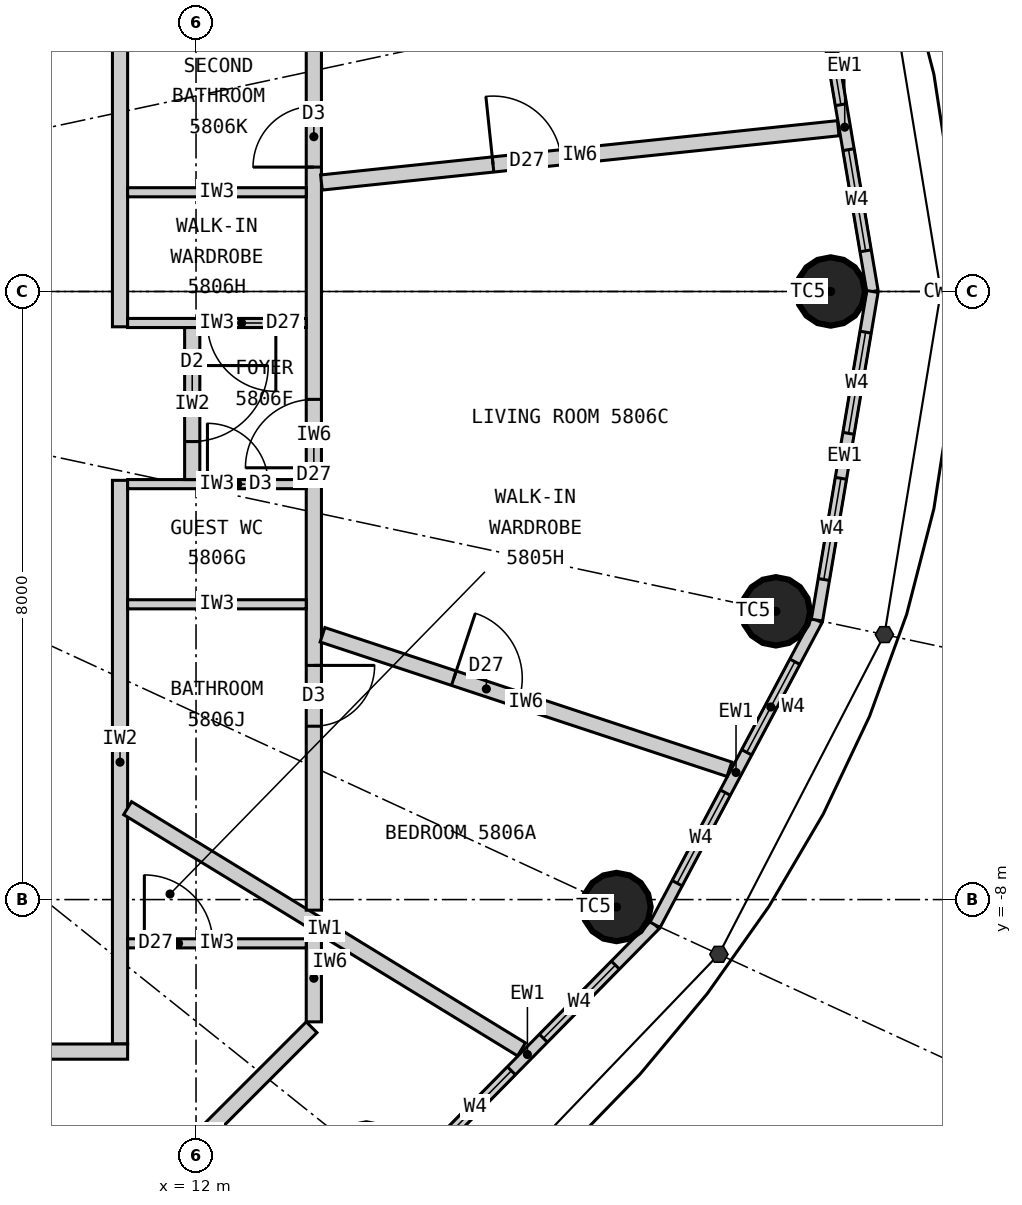
"""IFC4 building model, lengths in metres.
Left out: names, types, materials, properties, quantities, classifications, styles, units other than length and angle.
Written with IfcOpenShell. Run it as: python <this file> out.ifc"""

import sys

from ifc_helpers import new_model, si_unit, direction, frame, frame_2d, origin, origin_2d, place, context, subcontext, project, spatial, rectangle, circle, extrude, element, fill, save


model = new_model("IFC4")
c1 = context("Model", 3, precision=1e-05, world=origin(), true_north=direction((0.0, 1.0)))
c2 = subcontext(c1, "Body", "Model", "MODEL_VIEW")
j1 = project(units=[si_unit("LENGTHUNIT", "METRE"), si_unit("PLANEANGLEUNIT", "RADIAN")], contexts=[c1])
p1 = place(None, origin())
s1 = spatial("IfcSite", under=j1, at=p1, CompositionType="ELEMENT")
p2 = place(p1, origin())
s2 = spatial("IfcBuilding", under=s1, at=p2, CompositionType="ELEMENT")
p3 = place(p2, frame((0.0, 0.0, 216.0)))
s3 = spatial("IfcBuildingStorey", under=s2, at=p3, CompositionType="ELEMENT", Elevation=216.0)
for number, where, z_axis, x_axis in (
    (1, (20.35, 0.0, 0.0), (0.0, 0.0, 1.0), (1.0, 0.0, 0.0)),
    (2, (14.241, -11.393, 0.0), (0.0, 0.0, 1.0), (1.0, 0.0, 0.0)),
    (3, (17.532, -8.098, 0.0), (0.0, 0.0, 1.0), (1.0, 0.0, 0.0)),
    (4, (19.629, -4.208, 0.0), (0.0, 0.0, 1.0), (1.0, 0.0, 0.0)),
):
    element("IfcColumn", number, at=place(p3, frame(where, z_axis=z_axis, x_axis=x_axis)), inside=s3, PredefinedType="COLUMN", context=c2, shape_type="SweptSolid", body=[
        extrude(circle(Radius=0.45, at=origin_2d()), origin(), (0.0, 0.0, 1.0), 3.3),
    ])
p4 = place(p3, frame((20.9, 0.0, 0.0), z_axis=(0.0, 0.0, 1.0), x_axis=(-0.166538513568, 0.986034950445, 0.0)))
e5 = element("IfcWall", 5, at=p4, inside=s3, PredefinedType="ELEMENTEDWALL", context=c2, shape_type="SweptSolid", body=[
    extrude(rectangle(XDim=4.385, YDim=0.15, at=frame_2d((2.192, 0.0))), origin(), (0.0, 0.0, 1.0), 3.12),
])
p5 = place(p4, frame((0.542, 0.0, 0.9)))
e6 = element("IfcOpeningElement", 6, at=p5, cuts=e5, PredefinedType="OPENING", context=c2, shape_type="SweptSolid", body=[
    extrude(rectangle(XDim=1.35, YDim=1.9, at=frame_2d((0.675, 0.95))), frame((0.0, 0.085, 0.0), z_axis=(0.0, -1.0, 0.0), x_axis=(1.0, 0.0, 0.0)), (0.0, 0.0, 1.0), 0.17),
])
p6 = place(p4, frame((2.492, 0.0, 0.9)))
e7 = element("IfcOpeningElement", 7, at=p6, cuts=e5, PredefinedType="OPENING", context=c2, shape_type="SweptSolid", body=[
    extrude(rectangle(XDim=1.35, YDim=1.9, at=frame_2d((0.675, 0.95))), frame((0.0, 0.085, 0.0), z_axis=(0.0, -1.0, 0.0), x_axis=(1.0, 0.0, 0.0)), (0.0, 0.0, 1.0), 0.17),
])
p7 = place(p3, frame((14.68, -11.744, 0.0), z_axis=(0.0, 0.0, 1.0), x_axis=(0.701527379618, 0.712642501993, 0.0)))
e8 = element("IfcWall", 8, at=p7, inside=s3, PredefinedType="ELEMENTEDWALL", context=c2, shape_type="SweptSolid", body=[
    extrude(rectangle(XDim=4.788, YDim=0.15, at=frame_2d((2.394, 0.0))), origin(), (0.0, 0.0, 1.0), 3.12),
])
p8 = place(p7, frame((0.744, 0.0, 0.9)))
e9 = element("IfcOpeningElement", 9, at=p8, cuts=e8, PredefinedType="OPENING", context=c2, shape_type="SweptSolid", body=[
    extrude(rectangle(XDim=1.35, YDim=1.9, at=frame_2d((0.675, 0.95))), frame((0.0, 0.085, 0.0), z_axis=(0.0, -1.0, 0.0), x_axis=(1.0, 0.0, 0.0)), (0.0, 0.0, 1.0), 0.17),
])
p9 = place(p7, frame((2.694, 0.0, 0.9)))
e10 = element("IfcOpeningElement", 10, at=p9, cuts=e8, PredefinedType="OPENING", context=c2, shape_type="SweptSolid", body=[
    extrude(rectangle(XDim=1.35, YDim=1.9, at=frame_2d((0.675, 0.95))), frame((0.0, 0.085, 0.0), z_axis=(0.0, -1.0, 0.0), x_axis=(1.0, 0.0, 0.0)), (0.0, 0.0, 1.0), 0.17),
])
p10 = place(p3, frame((18.04, -8.332, 0.0), z_axis=(0.0, 0.0, 1.0), x_axis=(0.469256152955, 0.883062094597, 0.0)))
e11 = element("IfcWall", 11, at=p10, inside=s3, PredefinedType="ELEMENTEDWALL", context=c2, shape_type="SweptSolid", body=[
    extrude(rectangle(XDim=4.539, YDim=0.15, at=frame_2d((2.27, 0.0))), origin(), (0.0, 0.0, 1.0), 3.12),
])
p11 = place(p10, frame((0.62, 0.0, 0.9)))
e12 = element("IfcOpeningElement", 12, at=p11, cuts=e11, PredefinedType="OPENING", context=c2, shape_type="SweptSolid", body=[
    extrude(rectangle(XDim=1.35, YDim=1.9, at=frame_2d((0.675, 0.95))), frame((0.0, 0.085, 0.0), z_axis=(0.0, -1.0, 0.0), x_axis=(1.0, 0.0, 0.0)), (0.0, 0.0, 1.0), 0.17),
])
p12 = place(p10, frame((2.57, 0.0, 0.9)))
e13 = element("IfcOpeningElement", 13, at=p12, cuts=e11, PredefinedType="OPENING", context=c2, shape_type="SweptSolid", body=[
    extrude(rectangle(XDim=1.35, YDim=1.9, at=frame_2d((0.675, 0.95))), frame((0.0, 0.085, 0.0), z_axis=(0.0, -1.0, 0.0), x_axis=(1.0, 0.0, 0.0)), (0.0, 0.0, 1.0), 0.17),
])
p13 = place(p3, frame((20.17, -4.323, 0.0), z_axis=(0.0, 0.0, 1.0), x_axis=(0.166538513568, 0.986034950445, 0.0)))
e14 = element("IfcWall", 14, at=p13, inside=s3, PredefinedType="ELEMENTEDWALL", context=c2, shape_type="SweptSolid", body=[
    extrude(rectangle(XDim=4.385, YDim=0.15, at=frame_2d((2.192, 0.0))), origin(), (0.0, 0.0, 1.0), 3.12),
])
p14 = place(p13, frame((0.542, 0.0, 0.9)))
e15 = element("IfcOpeningElement", 15, at=p14, cuts=e14, PredefinedType="OPENING", context=c2, shape_type="SweptSolid", body=[
    extrude(rectangle(XDim=1.35, YDim=1.9, at=frame_2d((0.675, 0.95))), frame((0.0, 0.085, 0.0), z_axis=(0.0, -1.0, 0.0), x_axis=(1.0, 0.0, 0.0)), (0.0, 0.0, 1.0), 0.17),
])
p15 = place(p13, frame((2.492, 0.0, 0.9)))
e16 = element("IfcOpeningElement", 16, at=p15, cuts=e14, PredefinedType="OPENING", context=c2, shape_type="SweptSolid", body=[
    extrude(rectangle(XDim=1.35, YDim=1.9, at=frame_2d((0.675, 0.95))), frame((0.0, 0.085, 0.0), z_axis=(0.0, -1.0, 0.0), x_axis=(1.0, 0.0, 0.0)), (0.0, 0.0, 1.0), 0.17),
])
p16 = place(p3, frame((11.0, -9.9, 0.0), z_axis=(0.0, 0.0, 1.0), x_axis=(0.0, 1.0, 0.0)))
e17 = element("IfcWall", 17, at=p16, inside=s3, PredefinedType="PARTITIONING", context=c2, shape_type="SweptSolid", body=[
    extrude(rectangle(XDim=7.416, YDim=0.2, at=frame_2d((3.708, 0.0))), origin(), (0.0, 0.0, 1.0), 3.12),
])
p17 = place(p3, frame((11.0, -0.464, 0.0), z_axis=(0.0, 0.0, 1.0), x_axis=(0.0, 1.0, 0.0)))
e18 = element("IfcWall", 18, at=p17, inside=s3, PredefinedType="PARTITIONING", context=c2, shape_type="SweptSolid", body=[
    extrude(rectangle(XDim=10.364, YDim=0.2, at=frame_2d((5.182, 0.0))), origin(), (0.0, 0.0, 1.0), 3.12),
])
p18 = place(p3, frame((11.1, -10.0, 0.0), z_axis=(0.0, 0.0, 1.0), x_axis=(-1.0, 0.0, 0.0)))
e19 = element("IfcWall", 19, at=p18, inside=s3, PredefinedType="PARTITIONING", context=c2, shape_type="SweptSolid", body=[
    extrude(rectangle(XDim=22.2, YDim=0.2, at=frame_2d((11.1, 0.0))), origin(), (0.0, 0.0, 1.0), 3.12),
])
p19 = place(p18, frame((18.864, 0.0, 0.0)))
e20 = element("IfcOpeningElement", 20, at=p19, cuts=e19, PredefinedType="OPENING", context=c2, shape_type="SweptSolid", body=[
    extrude(rectangle(XDim=1.0, YDim=2.2, at=frame_2d((0.5, 1.1))), frame((0.0, 0.11, 0.0), z_axis=(0.0, -1.0, 0.0), x_axis=(1.0, 0.0, 0.0)), (0.0, 0.0, 1.0), 0.22),
])
p20 = place(p18, frame((2.309, 0.0, 0.0)))
e21 = element("IfcOpeningElement", 21, at=p20, cuts=e19, PredefinedType="OPENING", context=c2, shape_type="SweptSolid", body=[
    extrude(rectangle(XDim=1.0, YDim=2.2, at=frame_2d((0.5, 1.1))), frame((0.0, 0.11, 0.0), z_axis=(0.0, -1.0, 0.0), x_axis=(1.0, 0.0, 0.0)), (0.0, 0.0, 1.0), 0.22),
])
p21 = place(p3, frame((11.1, -6.797, 0.0), z_axis=(0.0, 0.0, 1.0), x_axis=(0.852799818179, -0.522237943963, 0.0)))
e22 = element("IfcWall", 22, at=p21, inside=s3, PredefinedType="PARTITIONING", context=c2, shape_type="SweptSolid", body=[
    extrude(rectangle(XDim=6.077, YDim=0.2, at=frame_2d((3.039, 0.0))), origin(), (0.0, 0.0, 1.0), 3.12),
])
p22 = place(p3, frame((10.679, -12.521, 0.0), z_axis=(0.0, 0.0, 1.0), x_axis=(0.707106781187, 0.707106781187, 0.0)))
e23 = element("IfcWall", 23, at=p22, inside=s3, PredefinedType="PARTITIONING", context=c2, shape_type="SweptSolid", body=[
    extrude(rectangle(XDim=4.019, YDim=0.2, at=frame_2d((2.009, 0.0))), origin(), (0.0, 0.0, 1.0), 3.12),
])
p23 = place(p3, frame((13.55, -9.609, 0.0), z_axis=(0.0, 0.0, 1.0), x_axis=(0.0, 1.0, 0.0)))
e24 = element("IfcWall", 24, at=p23, inside=s3, PredefinedType="PARTITIONING", context=c2, shape_type="SweptSolid", body=[
    extrude(rectangle(XDim=1.148, YDim=0.2, at=frame_2d((0.574, 0.0))), origin(), (0.0, 0.0, 1.0), 3.12),
])
p24 = place(p3, frame((11.1, -8.576, 0.0), z_axis=(0.0, 0.0, 1.0), x_axis=(1.0, 0.0, 0.0)))
e25 = element("IfcWall", 25, at=p24, inside=s3, PredefinedType="PARTITIONING", context=c2, shape_type="SweptSolid", body=[
    extrude(rectangle(XDim=2.35, YDim=0.12, at=frame_2d((1.175, 0.0))), origin(), (0.0, 0.0, 1.0), 3.12),
])
p25 = place(p24, frame((0.22, 0.0, 0.0)))
e26 = element("IfcOpeningElement", 26, at=p25, cuts=e25, PredefinedType="OPENING", context=c2, shape_type="SweptSolid", body=[
    extrude(rectangle(XDim=0.9, YDim=2.1, at=frame_2d((0.45, 1.05))), frame((0.0, 0.07, 0.0), z_axis=(0.0, -1.0, 0.0), x_axis=(1.0, 0.0, 0.0)), (0.0, 0.0, 1.0), 0.14),
])
p26 = place(p3, frame((13.55, -8.139, 0.0), z_axis=(0.0, 0.0, 1.0), x_axis=(0.0, 1.0, 0.0)))
e27 = element("IfcWall", 27, at=p26, inside=s3, PredefinedType="PARTITIONING", context=c2, shape_type="SweptSolid", body=[
    extrude(rectangle(XDim=12.496, YDim=0.2, at=frame_2d((6.248, 0.0))), origin(), (0.0, 0.0, 1.0), 3.12),
])
p27 = place(p26, frame((2.42, 0.0, 0.0)))
e28 = element("IfcOpeningElement", 28, at=p27, cuts=e27, PredefinedType="OPENING", context=c2, shape_type="SweptSolid", body=[
    extrude(rectangle(XDim=0.8, YDim=2.1, at=frame_2d((0.4, 1.05))), frame((0.0, 0.11, 0.0), z_axis=(0.0, -1.0, 0.0), x_axis=(1.0, 0.0, 0.0)), (0.0, 0.0, 1.0), 0.22),
])
p28 = place(p26, frame((9.776, 0.0, 0.0)))
e29 = element("IfcOpeningElement", 29, at=p28, cuts=e27, PredefinedType="OPENING", context=c2, shape_type="SweptSolid", body=[
    extrude(rectangle(XDim=0.8, YDim=2.1, at=frame_2d((0.4, 1.05))), frame((0.0, 0.11, 0.0), z_axis=(0.0, -1.0, 0.0), x_axis=(1.0, 0.0, 0.0)), (0.0, 0.0, 1.0), 0.22),
])
p29 = place(p26, frame((5.82, 0.0, 0.0)))
e30 = element("IfcOpeningElement", 30, at=p29, cuts=e27, PredefinedType="OPENING", context=c2, shape_type="SweptSolid", body=[
    extrude(rectangle(XDim=0.9, YDim=2.1, at=frame_2d((0.45, 1.05))), frame((0.0, 0.11, 0.0), z_axis=(0.0, -1.0, 0.0), x_axis=(1.0, 0.0, 0.0)), (0.0, 0.0, 1.0), 0.22),
])
p30 = place(p3, frame((13.664, -4.516, 0.0), z_axis=(0.0, 0.0, 1.0), x_axis=(0.949481375941, -0.313823384632, 0.0)))
e31 = element("IfcWall", 31, at=p30, inside=s3, PredefinedType="PARTITIONING", context=c2, shape_type="SweptSolid", body=[
    extrude(rectangle(XDim=5.638, YDim=0.2, at=frame_2d((2.819, 0.0))), origin(), (0.0, 0.0, 1.0), 3.12),
])
p31 = place(p30, frame((1.82, 0.0, 0.0)))
e32 = element("IfcOpeningElement", 32, at=p31, cuts=e31, PredefinedType="OPENING", context=c2, shape_type="SweptSolid", body=[
    extrude(rectangle(XDim=0.9, YDim=2.1, at=frame_2d((0.45, 1.05))), frame((0.0, 0.11, 0.0), z_axis=(0.0, -1.0, 0.0), x_axis=(1.0, 0.0, 0.0)), (0.0, 0.0, 1.0), 0.22),
])
p32 = place(p3, frame((13.65, 1.434, 0.0), z_axis=(0.0, 0.0, 1.0), x_axis=(0.994526954268, 0.10448031984, 0.0)))
e33 = element("IfcWall", 33, at=p32, inside=s3, PredefinedType="PARTITIONING", context=c2, shape_type="SweptSolid", body=[
    extrude(rectangle(XDim=6.837, YDim=0.2, at=frame_2d((3.418, 0.0))), origin(), (0.0, 0.0, 1.0), 2.47),
])
p33 = place(p32, frame((2.27, 0.0, 0.0)))
e34 = element("IfcOpeningElement", 34, at=p33, cuts=e33, PredefinedType="OPENING", context=c2, shape_type="SweptSolid", body=[
    extrude(rectangle(XDim=0.9, YDim=2.1, at=frame_2d((0.45, 1.05))), frame((0.0, 0.11, 0.0), z_axis=(0.0, -1.0, 0.0), x_axis=(1.0, 0.0, 0.0)), (0.0, 0.0, 1.0), 0.22),
])
p34 = place(p3, frame((11.1, -4.115, 0.0), z_axis=(0.0, 0.0, 1.0), x_axis=(1.0, 0.0, 0.0)))
e35 = element("IfcWall", 35, at=p34, inside=s3, PredefinedType="PARTITIONING", context=c2, shape_type="SweptSolid", body=[
    extrude(rectangle(XDim=2.35, YDim=0.12, at=frame_2d((1.175, 0.0))), origin(), (0.0, 0.0, 1.0), 3.12),
])
p35 = place(p3, frame((11.1, -2.534, 0.0), z_axis=(0.0, 0.0, 1.0), x_axis=(1.0, 0.0, 0.0)))
e36 = element("IfcWall", 36, at=p35, inside=s3, PredefinedType="PARTITIONING", context=c2, shape_type="SweptSolid", body=[
    extrude(rectangle(XDim=2.35, YDim=0.12, at=frame_2d((1.175, 0.0))), origin(), (0.0, 0.0, 1.0), 3.12),
])
p36 = place(p35, frame((1.05, 0.0, 0.0)))
e37 = element("IfcOpeningElement", 37, at=p36, cuts=e36, PredefinedType="OPENING", context=c2, shape_type="SweptSolid", body=[
    extrude(rectangle(XDim=0.8, YDim=2.1, at=frame_2d((0.4, 1.05))), frame((0.0, 0.07, 0.0), z_axis=(0.0, -1.0, 0.0), x_axis=(1.0, 0.0, 0.0)), (0.0, 0.0, 1.0), 0.14),
])
p37 = place(p3, frame((11.1, -0.414, 0.0), z_axis=(0.0, 0.0, 1.0), x_axis=(1.0, 0.0, 0.0)))
e38 = element("IfcWall", 38, at=p37, inside=s3, PredefinedType="PARTITIONING", context=c2, shape_type="SweptSolid", body=[
    extrude(rectangle(XDim=2.35, YDim=0.12, at=frame_2d((1.175, 0.0))), origin(), (0.0, 0.0, 1.0), 3.12),
])
p38 = place(p37, frame((1.05, 0.0, 0.0)))
e39 = element("IfcOpeningElement", 39, at=p38, cuts=e38, PredefinedType="OPENING", context=c2, shape_type="SweptSolid", body=[
    extrude(rectangle(XDim=0.9, YDim=2.1, at=frame_2d((0.45, 1.05))), frame((0.0, 0.07, 0.0), z_axis=(0.0, -1.0, 0.0), x_axis=(1.0, 0.0, 0.0)), (0.0, 0.0, 1.0), 0.14),
])
p39 = place(p3, frame((11.1, 1.306, 0.0), z_axis=(0.0, 0.0, 1.0), x_axis=(1.0, 0.0, 0.0)))
e40 = element("IfcWall", 40, at=p39, inside=s3, PredefinedType="PARTITIONING", context=c2, shape_type="SweptSolid", body=[
    extrude(rectangle(XDim=2.35, YDim=0.12, at=frame_2d((1.175, 0.0))), origin(), (0.0, 0.0, 1.0), 3.12),
])
p40 = place(p3, frame((11.95, -2.474, 0.0), z_axis=(0.0, 0.0, 1.0), x_axis=(0.0, 1.0, 0.0)))
e41 = element("IfcWall", 41, at=p40, inside=s3, PredefinedType="PARTITIONING", context=c2, shape_type="SweptSolid", body=[
    extrude(rectangle(XDim=2.0, YDim=0.2, at=frame_2d((1.0, 0.0))), origin(), (0.0, 0.0, 1.0), 3.12),
])
p41 = place(p40, frame((0.5, 0.0, 0.0)))
e42 = element("IfcOpeningElement", 42, at=p41, cuts=e41, PredefinedType="OPENING", context=c2, shape_type="SweptSolid", body=[
    extrude(rectangle(XDim=1.0, YDim=2.2, at=frame_2d((0.5, 1.1))), frame((0.0, 0.11, 0.0), z_axis=(0.0, -1.0, 0.0), x_axis=(1.0, 0.0, 0.0)), (0.0, 0.0, 1.0), 0.22),
])
p42 = place(p5, origin())
e43 = element("IfcWindow", 43, at=p42, inside=s3, PartitioningType="SINGLE_PANEL", PredefinedType="WINDOW", context=c2, shape_type="SweptSolid", body=[
    extrude(rectangle(XDim=1.35, YDim=1.9, at=frame_2d((0.675, 0.95))), frame((0.0, 0.03, 0.0), z_axis=(0.0, -1.0, 0.0), x_axis=(1.0, 0.0, 0.0)), (0.0, 0.0, 1.0), 0.06),
])
fill(e6, e43)
p43 = place(p6, origin())
e44 = element("IfcWindow", 44, at=p43, inside=s3, PartitioningType="SINGLE_PANEL", PredefinedType="WINDOW", context=c2, shape_type="SweptSolid", body=[
    extrude(rectangle(XDim=1.35, YDim=1.9, at=frame_2d((0.675, 0.95))), frame((0.0, 0.03, 0.0), z_axis=(0.0, -1.0, 0.0), x_axis=(1.0, 0.0, 0.0)), (0.0, 0.0, 1.0), 0.06),
])
fill(e7, e44)
p44 = place(p8, origin())
e45 = element("IfcWindow", 45, at=p44, inside=s3, PartitioningType="SINGLE_PANEL", PredefinedType="WINDOW", context=c2, shape_type="SweptSolid", body=[
    extrude(rectangle(XDim=1.35, YDim=1.9, at=frame_2d((0.675, 0.95))), frame((0.0, 0.03, 0.0), z_axis=(0.0, -1.0, 0.0), x_axis=(1.0, 0.0, 0.0)), (0.0, 0.0, 1.0), 0.06),
])
fill(e9, e45)
p45 = place(p9, origin())
e46 = element("IfcWindow", 46, at=p45, inside=s3, PartitioningType="SINGLE_PANEL", PredefinedType="WINDOW", context=c2, shape_type="SweptSolid", body=[
    extrude(rectangle(XDim=1.35, YDim=1.9, at=frame_2d((0.675, 0.95))), frame((0.0, 0.03, 0.0), z_axis=(0.0, -1.0, 0.0), x_axis=(1.0, 0.0, 0.0)), (0.0, 0.0, 1.0), 0.06),
])
fill(e10, e46)
p46 = place(p11, origin())
e47 = element("IfcWindow", 47, at=p46, inside=s3, PartitioningType="SINGLE_PANEL", PredefinedType="WINDOW", context=c2, shape_type="SweptSolid", body=[
    extrude(rectangle(XDim=1.35, YDim=1.9, at=frame_2d((0.675, 0.95))), frame((0.0, 0.03, 0.0), z_axis=(0.0, -1.0, 0.0), x_axis=(1.0, 0.0, 0.0)), (0.0, 0.0, 1.0), 0.06),
])
fill(e12, e47)
p47 = place(p12, origin())
e48 = element("IfcWindow", 48, at=p47, inside=s3, PartitioningType="SINGLE_PANEL", PredefinedType="WINDOW", context=c2, shape_type="SweptSolid", body=[
    extrude(rectangle(XDim=1.35, YDim=1.9, at=frame_2d((0.675, 0.95))), frame((0.0, 0.03, 0.0), z_axis=(0.0, -1.0, 0.0), x_axis=(1.0, 0.0, 0.0)), (0.0, 0.0, 1.0), 0.06),
])
fill(e13, e48)
p48 = place(p14, origin())
e49 = element("IfcWindow", 49, at=p48, inside=s3, PartitioningType="SINGLE_PANEL", PredefinedType="WINDOW", context=c2, shape_type="SweptSolid", body=[
    extrude(rectangle(XDim=1.35, YDim=1.9, at=frame_2d((0.675, 0.95))), frame((0.0, 0.03, 0.0), z_axis=(0.0, -1.0, 0.0), x_axis=(1.0, 0.0, 0.0)), (0.0, 0.0, 1.0), 0.06),
])
fill(e15, e49)
p49 = place(p15, origin())
e50 = element("IfcWindow", 50, at=p49, inside=s3, PartitioningType="SINGLE_PANEL", PredefinedType="WINDOW", context=c2, shape_type="SweptSolid", body=[
    extrude(rectangle(XDim=1.35, YDim=1.9, at=frame_2d((0.675, 0.95))), frame((0.0, 0.03, 0.0), z_axis=(0.0, -1.0, 0.0), x_axis=(1.0, 0.0, 0.0)), (0.0, 0.0, 1.0), 0.06),
])
fill(e16, e50)
p50 = place(p25, origin())
e51 = element("IfcDoor", 51, at=p50, inside=s3, OperationType="SINGLE_SWING_LEFT", PredefinedType="DOOR", context=c2, shape_type="SweptSolid", body=[
    extrude(rectangle(XDim=0.9, YDim=2.1, at=frame_2d((0.45, 1.05))), frame((0.0, 0.025, 0.0), z_axis=(0.0, -1.0, 0.0), x_axis=(1.0, 0.0, 0.0)), (0.0, 0.0, 1.0), 0.05),
])
fill(e26, e51)
p51 = place(p41, origin())
e52 = element("IfcDoor", 52, at=p51, inside=s3, OperationType="SINGLE_SWING_RIGHT", PredefinedType="DOOR", context=c2, shape_type="SweptSolid", body=[
    extrude(rectangle(XDim=1.0, YDim=2.2, at=frame_2d((0.5, 1.1))), frame((0.0, 0.025, 0.0), z_axis=(0.0, -1.0, 0.0), x_axis=(1.0, 0.0, 0.0)), (0.0, 0.0, 1.0), 0.05),
])
fill(e42, e52)
p52 = place(p27, origin())
e53 = element("IfcDoor", 53, at=p52, inside=s3, OperationType="SINGLE_SWING_RIGHT", PredefinedType="DOOR", context=c2, shape_type="SweptSolid", body=[
    extrude(rectangle(XDim=0.8, YDim=2.1, at=frame_2d((0.4, 1.05))), frame((0.0, 0.025, 0.0), z_axis=(0.0, -1.0, 0.0), x_axis=(1.0, 0.0, 0.0)), (0.0, 0.0, 1.0), 0.05),
])
fill(e28, e53)
p53 = place(p36, origin())
e54 = element("IfcDoor", 54, at=p53, inside=s3, OperationType="SINGLE_SWING_LEFT", PredefinedType="DOOR", context=c2, shape_type="SweptSolid", body=[
    extrude(rectangle(XDim=0.8, YDim=2.1, at=frame_2d((0.4, 1.05))), frame((0.0, 0.025, 0.0), z_axis=(0.0, -1.0, 0.0), x_axis=(1.0, 0.0, 0.0)), (0.0, 0.0, 1.0), 0.05),
])
fill(e37, e54)
p54 = place(p38, origin())
e55 = element("IfcDoor", 55, at=p54, inside=s3, OperationType="SINGLE_SWING_RIGHT", PredefinedType="DOOR", context=c2, shape_type="SweptSolid", body=[
    extrude(rectangle(XDim=0.9, YDim=2.1, at=frame_2d((0.45, 1.05))), frame((0.0, 0.025, 0.0), z_axis=(0.0, -1.0, 0.0), x_axis=(1.0, 0.0, 0.0)), (0.0, 0.0, 1.0), 0.05),
])
fill(e39, e55)
p55 = place(p28, origin())
e56 = element("IfcDoor", 56, at=p55, inside=s3, OperationType="SINGLE_SWING_LEFT", PredefinedType="DOOR", context=c2, shape_type="SweptSolid", body=[
    extrude(rectangle(XDim=0.8, YDim=2.1, at=frame_2d((0.4, 1.05))), frame((0.0, 0.025, 0.0), z_axis=(0.0, -1.0, 0.0), x_axis=(1.0, 0.0, 0.0)), (0.0, 0.0, 1.0), 0.05),
])
fill(e29, e56)
p56 = place(p29, origin())
e57 = element("IfcDoor", 57, at=p56, inside=s3, OperationType="SINGLE_SWING_LEFT", PredefinedType="DOOR", context=c2, shape_type="SweptSolid", body=[
    extrude(rectangle(XDim=0.9, YDim=2.1, at=frame_2d((0.45, 1.05))), frame((0.0, 0.025, 0.0), z_axis=(0.0, -1.0, 0.0), x_axis=(1.0, 0.0, 0.0)), (0.0, 0.0, 1.0), 0.05),
])
fill(e30, e57)
p57 = place(p31, origin())
e58 = element("IfcDoor", 58, at=p57, inside=s3, OperationType="SINGLE_SWING_LEFT", PredefinedType="DOOR", context=c2, shape_type="SweptSolid", body=[
    extrude(rectangle(XDim=0.9, YDim=2.1, at=frame_2d((0.45, 1.05))), frame((0.0, 0.025, 0.0), z_axis=(0.0, -1.0, 0.0), x_axis=(1.0, 0.0, 0.0)), (0.0, 0.0, 1.0), 0.05),
])
fill(e32, e58)
p58 = place(p33, origin())
e59 = element("IfcDoor", 59, at=p58, inside=s3, OperationType="SINGLE_SWING_LEFT", PredefinedType="DOOR", context=c2, shape_type="SweptSolid", body=[
    extrude(rectangle(XDim=0.9, YDim=2.1, at=frame_2d((0.45, 1.05))), frame((0.0, 0.025, 0.0), z_axis=(0.0, -1.0, 0.0), x_axis=(1.0, 0.0, 0.0)), (0.0, 0.0, 1.0), 0.05),
])
fill(e34, e59)
save(model, sys.argv[1])
